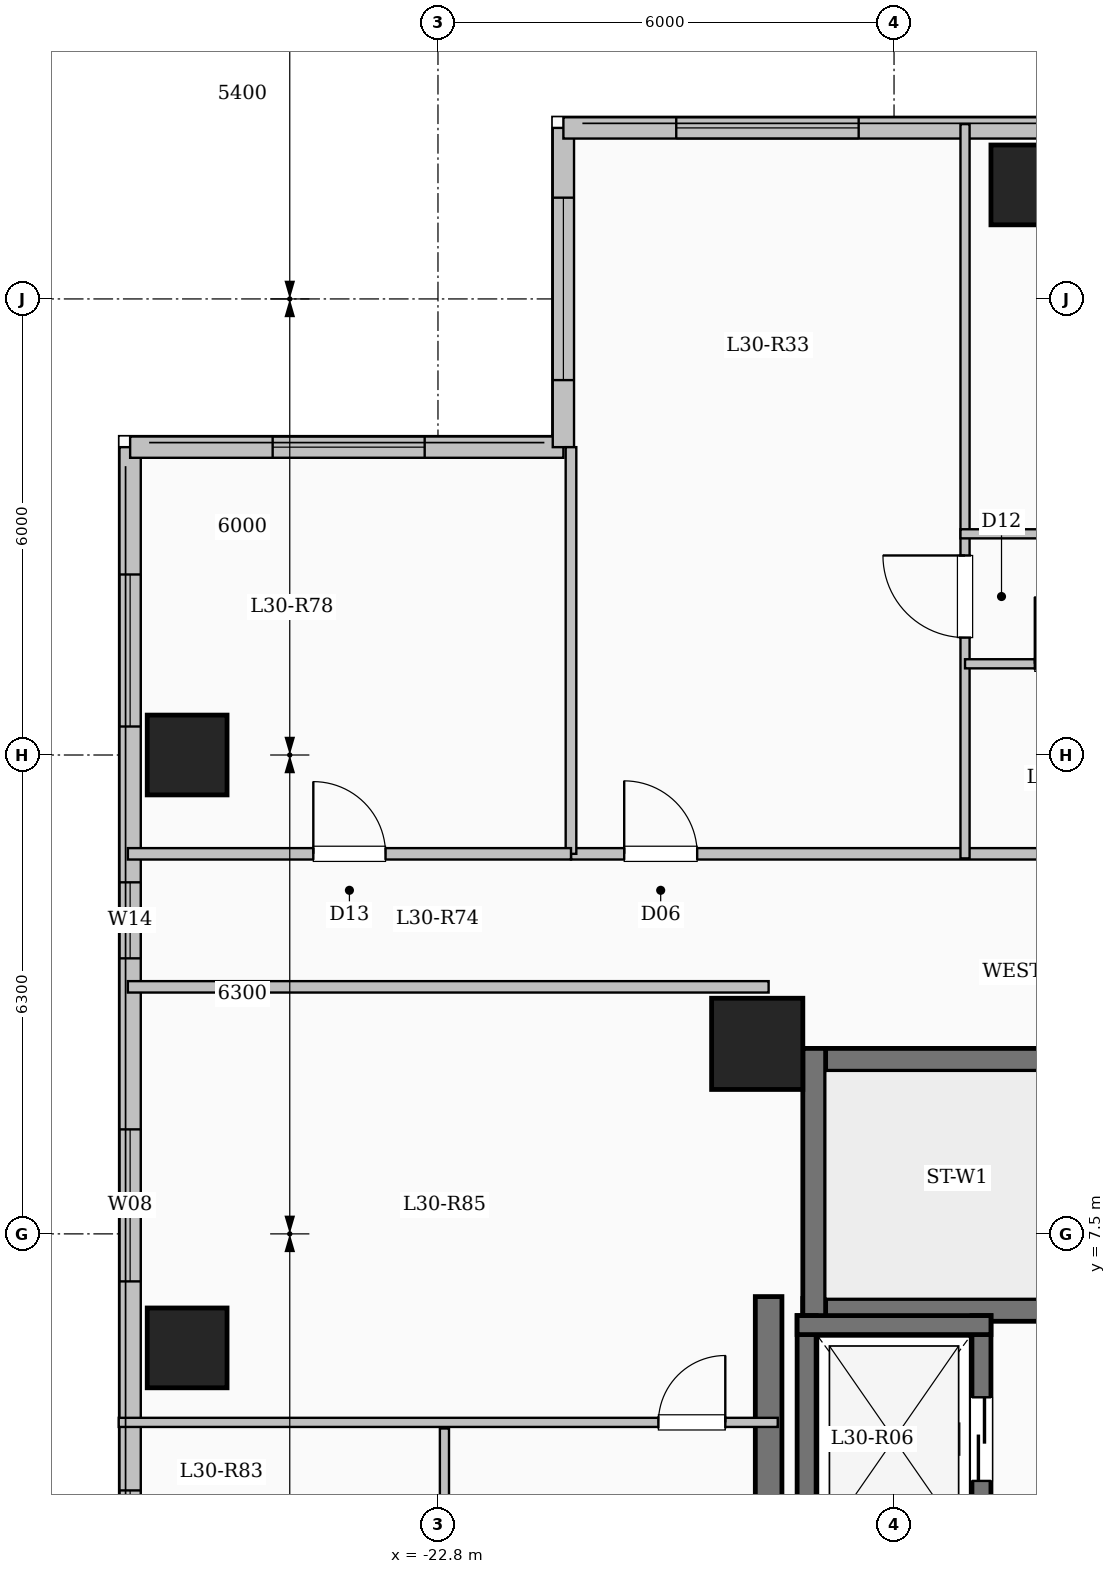
"""IFC4 building model, lengths in metres.
Left out: names, types, materials, properties, quantities, classifications, styles, units other than length and angle.
Written with IfcOpenShell. Run it as: python <this file> out.ifc"""

import sys

from ifc_helpers import new_model, si_unit, direction, frame, frame_2d, origin, origin_2d, place, context, subcontext, project, spatial, rectangle, extrude, element, fill, save


model = new_model("IFC4")
c1 = context("Model", 3, precision=1e-05, world=origin(), true_north=direction((0.0, 1.0)))
c2 = subcontext(c1, "Body", "Model", "MODEL_VIEW")
j1 = project(units=[si_unit("LENGTHUNIT", "METRE"), si_unit("PLANEANGLEUNIT", "RADIAN")], contexts=[c1])
p1 = place(None, origin())
s1 = spatial("IfcSite", under=j1, at=p1, CompositionType="ELEMENT")
p2 = place(p1, origin())
s2 = spatial("IfcBuilding", under=s1, at=p2, CompositionType="ELEMENT")
p3 = place(p2, frame((0.0, 0.0, 111.8)))
s3 = spatial("IfcBuildingStorey", under=s2, at=p3, CompositionType="ELEMENT", Elevation=111.8)
p4 = place(p3, frame((-18.6, 10.0, 0.0), z_axis=(0.0, 0.0, 1.0), x_axis=(1.0, 0.0, 0.0)))
e1 = element("IfcColumn", 1, at=p4, inside=s3, PredefinedType="COLUMN", context=c2, shape_type="SweptSolid", body=[
    extrude(rectangle(XDim=1.2, YDim=1.2, at=origin_2d()), origin(), (0.0, 0.0, 1.0), 3.35),
])
for number, where, z_axis, x_axis in (
    (2, (-15.0, 21.3, 0.0), (0.0, 0.0, 1.0), (1.0, 0.0, 0.0)),
    (3, (-26.1, 6.0, 0.0), (0.0, 0.0, 1.0), (1.0, 0.0, 0.0)),
    (4, (-26.1, 13.8, 0.0), (0.0, 0.0, 1.0), (1.0, 0.0, 0.0)),
):
    element("IfcColumn", number, at=place(p3, frame(where, z_axis=z_axis, x_axis=x_axis)), inside=s3, PredefinedType="COLUMN", context=c2, shape_type="SweptSolid", body=[
        extrude(rectangle(XDim=1.05, YDim=1.05, at=origin_2d()), origin(), (0.0, 0.0, 1.0), 3.35),
    ])
p5 = place(p3, frame((-26.85, -17.85, 0.0), z_axis=(0.0, 0.0, 1.0), x_axis=(0.0, 1.0, 0.0)))
e5 = element("IfcWall", 5, at=p5, inside=s3, PredefinedType="SOLIDWALL", context=c2, shape_type="SweptSolid", body=[
    extrude(rectangle(XDim=35.7, YDim=0.28, at=frame_2d((17.85, 0.0))), origin(), (0.0, 0.0, 1.0), 3.1),
])
p6 = place(p5, frame((2.55, 0.0, 0.9)))
e6 = element("IfcOpeningElement", 6, at=p6, cuts=e5, PredefinedType="OPENING", context=c2, shape_type="SweptSolid", body=[
    extrude(rectangle(XDim=2.4, YDim=1.8, at=frame_2d((1.2, 0.9))), frame((0.0, 0.15, 0.0), z_axis=(0.0, -1.0, 0.0), x_axis=(1.0, 0.0, 0.0)), (0.0, 0.0, 1.0), 0.3),
])
p7 = place(p5, frame((8.343, 0.0, 0.9)))
e7 = element("IfcOpeningElement", 7, at=p7, cuts=e5, PredefinedType="OPENING", context=c2, shape_type="SweptSolid", body=[
    extrude(rectangle(XDim=1.5, YDim=1.65, at=frame_2d((0.75, 0.825))), frame((0.0, 0.15, 0.0), z_axis=(0.0, -1.0, 0.0), x_axis=(1.0, 0.0, 0.0)), (0.0, 0.0, 1.0), 0.3),
])
p8 = place(p5, frame((13.75, 0.0, 0.9)))
e8 = element("IfcOpeningElement", 8, at=p8, cuts=e5, PredefinedType="OPENING", context=c2, shape_type="SweptSolid", body=[
    extrude(rectangle(XDim=2.4, YDim=1.8, at=frame_2d((1.2, 0.9))), frame((0.0, 0.15, 0.0), z_axis=(0.0, -1.0, 0.0), x_axis=(1.0, 0.0, 0.0)), (0.0, 0.0, 1.0), 0.3),
])
p9 = place(p5, frame((20.175, 0.0, 0.9)))
e9 = element("IfcOpeningElement", 9, at=p9, cuts=e5, PredefinedType="OPENING", context=c2, shape_type="SweptSolid", body=[
    extrude(rectangle(XDim=1.8, YDim=1.65, at=frame_2d((0.9, 0.825))), frame((0.0, 0.15, 0.0), z_axis=(0.0, -1.0, 0.0), x_axis=(1.0, 0.0, 0.0)), (0.0, 0.0, 1.0), 0.3),
])
p10 = place(p5, frame((24.725, 0.0, 0.9)))
e10 = element("IfcOpeningElement", 10, at=p10, cuts=e5, PredefinedType="OPENING", context=c2, shape_type="SweptSolid", body=[
    extrude(rectangle(XDim=2.0, YDim=1.7, at=frame_2d((1.0, 0.85))), frame((0.0, 0.15, 0.0), z_axis=(0.0, -1.0, 0.0), x_axis=(1.0, 0.0, 0.0)), (0.0, 0.0, 1.0), 0.3),
])
p11 = place(p5, frame((28.975, 0.0, 0.95)))
e11 = element("IfcOpeningElement", 11, at=p11, cuts=e5, PredefinedType="OPENING", context=c2, shape_type="SweptSolid", body=[
    extrude(rectangle(XDim=1.0, YDim=1.5, at=frame_2d((0.5, 0.75))), frame((0.0, 0.15, 0.0), z_axis=(0.0, -1.0, 0.0), x_axis=(1.0, 0.0, 0.0)), (0.0, 0.0, 1.0), 0.3),
])
p12 = place(p5, frame((32.025, 0.0, 0.9)))
e12 = element("IfcOpeningElement", 12, at=p12, cuts=e5, PredefinedType="OPENING", context=c2, shape_type="SweptSolid", body=[
    extrude(rectangle(XDim=2.0, YDim=1.7, at=frame_2d((1.0, 0.85))), frame((0.0, 0.15, 0.0), z_axis=(0.0, -1.0, 0.0), x_axis=(1.0, 0.0, 0.0)), (0.0, 0.0, 1.0), 0.3),
])
p13 = place(p3, frame((-26.85, 17.85, 0.0), z_axis=(0.0, 0.0, 1.0), x_axis=(1.0, 0.0, 0.0)))
e13 = element("IfcWall", 13, at=p13, inside=s3, PredefinedType="SOLIDWALL", context=c2, shape_type="SweptSolid", body=[
    extrude(rectangle(XDim=5.7, YDim=0.28, at=frame_2d((2.85, 0.0))), origin(), (0.0, 0.0, 1.0), 3.1),
])
p14 = place(p13, frame((1.875, 0.0, 0.9)))
e14 = element("IfcOpeningElement", 14, at=p14, cuts=e13, PredefinedType="OPENING", context=c2, shape_type="SweptSolid", body=[
    extrude(rectangle(XDim=2.0, YDim=1.7, at=frame_2d((1.0, 0.85))), frame((0.0, 0.15, 0.0), z_axis=(0.0, -1.0, 0.0), x_axis=(1.0, 0.0, 0.0)), (0.0, 0.0, 1.0), 0.3),
])
p15 = place(p3, frame((-21.15, 17.85, 0.0), z_axis=(0.0, 0.0, 1.0), x_axis=(0.0, 1.0, 0.0)))
e15 = element("IfcWall", 15, at=p15, inside=s3, PredefinedType="SOLIDWALL", context=c2, shape_type="SweptSolid", body=[
    extrude(rectangle(XDim=4.2, YDim=0.28, at=frame_2d((2.1, 0.0))), origin(), (0.0, 0.0, 1.0), 3.1),
])
p16 = place(p15, frame((0.882, 0.0, 0.9)))
e16 = element("IfcOpeningElement", 16, at=p16, cuts=e15, PredefinedType="OPENING", context=c2, shape_type="SweptSolid", body=[
    extrude(rectangle(XDim=2.4, YDim=1.8, at=frame_2d((1.2, 0.9))), frame((0.0, 0.15, 0.0), z_axis=(0.0, -1.0, 0.0), x_axis=(1.0, 0.0, 0.0)), (0.0, 0.0, 1.0), 0.3),
])
p17 = place(p3, frame((-21.15, 22.05, 0.0), z_axis=(0.0, 0.0, 1.0), x_axis=(1.0, 0.0, 0.0)))
e17 = element("IfcWall", 17, at=p17, inside=s3, PredefinedType="SOLIDWALL", context=c2, shape_type="SweptSolid", body=[
    extrude(rectangle(XDim=13.8, YDim=0.28, at=frame_2d((6.9, 0.0))), origin(), (0.0, 0.0, 1.0), 3.1),
])
p18 = place(p17, frame((1.485, 0.0, 0.9)))
e18 = element("IfcOpeningElement", 18, at=p18, cuts=e17, PredefinedType="OPENING", context=c2, shape_type="SweptSolid", body=[
    extrude(rectangle(XDim=2.4, YDim=1.8, at=frame_2d((1.2, 0.9))), frame((0.0, 0.15, 0.0), z_axis=(0.0, -1.0, 0.0), x_axis=(1.0, 0.0, 0.0)), (0.0, 0.0, 1.0), 0.3),
])
p19 = place(p17, frame((6.979, 0.0, 0.9)))
e19 = element("IfcOpeningElement", 19, at=p19, cuts=e17, PredefinedType="OPENING", context=c2, shape_type="SweptSolid", body=[
    extrude(rectangle(XDim=1.8, YDim=1.65, at=frame_2d((0.9, 0.825))), frame((0.0, 0.15, 0.0), z_axis=(0.0, -1.0, 0.0), x_axis=(1.0, 0.0, 0.0)), (0.0, 0.0, 1.0), 0.3),
])
p20 = place(p17, frame((11.294, 0.0, 0.9)))
e20 = element("IfcOpeningElement", 20, at=p20, cuts=e17, PredefinedType="OPENING", context=c2, shape_type="SweptSolid", body=[
    extrude(rectangle(XDim=1.8, YDim=1.65, at=frame_2d((0.9, 0.825))), frame((0.0, 0.15, 0.0), z_axis=(0.0, -1.0, 0.0), x_axis=(1.0, 0.0, 0.0)), (0.0, 0.0, 1.0), 0.3),
])
p21 = place(p3, frame((-18.0, 9.79, 0.0), z_axis=(0.0, 0.0, 1.0), x_axis=(1.0, 0.0, 0.0)))
e21 = element("IfcWall", 21, at=p21, inside=s3, PredefinedType="SHEAR", context=c2, shape_type="SweptSolid", body=[
    extrude(rectangle(XDim=8.0, YDim=0.3, at=frame_2d((4.0, 0.0))), origin(), (0.0, 0.0, 1.0), 3.35),
])
p22 = place(p3, frame((-18.0, 6.5, 0.0), z_axis=(0.0, 0.0, 1.0), x_axis=(1.0, 0.0, 0.0)))
e22 = element("IfcWall", 22, at=p22, inside=s3, PredefinedType="SHEAR", context=c2, shape_type="SweptSolid", body=[
    extrude(rectangle(XDim=8.0, YDim=0.3, at=frame_2d((4.0, 0.0))), origin(), (0.0, 0.0, 1.0), 3.35),
])
p23 = place(p22, frame((6.45, 0.0, 0.0)))
e23 = element("IfcOpeningElement", 23, at=p23, cuts=e22, PredefinedType="OPENING", context=c2, shape_type="SweptSolid", body=[
    extrude(rectangle(XDim=1.0, YDim=2.15, at=frame_2d((0.5, 1.075))), frame((0.0, 0.16, 0.0), z_axis=(0.0, -1.0, 0.0), x_axis=(1.0, 0.0, 0.0)), (0.0, 0.0, 1.0), 0.32),
])
p24 = place(p3, frame((-17.85, 6.35, 0.0), z_axis=(0.0, 0.0, 1.0), x_axis=(0.0, 1.0, 0.0)))
e24 = element("IfcWall", 24, at=p24, inside=s3, PredefinedType="SHEAR", context=c2, shape_type="SweptSolid", body=[
    extrude(rectangle(XDim=3.59, YDim=0.3, at=frame_2d((1.795, 0.0))), origin(), (0.0, 0.0, 1.0), 3.35),
])
p25 = place(p3, frame((-17.95, 3.175, 0.0), z_axis=(0.0, 0.0, 1.0), x_axis=(0.0, 1.0, 0.0)))
e25 = element("IfcWall", 25, at=p25, inside=s3, PredefinedType="SHEAR", context=c2, shape_type="SweptSolid", body=[
    extrude(rectangle(XDim=3.25, YDim=0.25, at=frame_2d((1.625, 0.0))), origin(), (0.0, 0.0, 1.0), 3.35),
])
p26 = place(p3, frame((-15.65, 3.175, 0.0), z_axis=(0.0, 0.0, 1.0), x_axis=(0.0, 1.0, 0.0)))
e26 = element("IfcWall", 26, at=p26, inside=s3, PredefinedType="SHEAR", context=c2, shape_type="SweptSolid", body=[
    extrude(rectangle(XDim=3.25, YDim=0.25, at=frame_2d((1.625, 0.0))), origin(), (0.0, 0.0, 1.0), 3.35),
])
p27 = place(p26, frame((1.075, 0.0, 0.0)))
e27 = element("IfcOpeningElement", 27, at=p27, cuts=e26, PredefinedType="OPENING", context=c2, shape_type="SweptSolid", body=[
    extrude(rectangle(XDim=1.1, YDim=2.15, at=frame_2d((0.55, 1.075))), frame((0.0, 0.135, 0.0), z_axis=(0.0, -1.0, 0.0), x_axis=(1.0, 0.0, 0.0)), (0.0, 0.0, 1.0), 0.27),
])
p28 = place(p3, frame((-18.075, 6.3, 0.0), z_axis=(0.0, 0.0, 1.0), x_axis=(1.0, 0.0, 0.0)))
e28 = element("IfcWall", 28, at=p28, inside=s3, PredefinedType="SHEAR", context=c2, shape_type="SweptSolid", body=[
    extrude(rectangle(XDim=2.55, YDim=0.25, at=frame_2d((1.275, 0.0))), origin(), (0.0, 0.0, 1.0), 3.35),
])
p29 = place(p3, frame((-18.45, -7.375, 0.0), z_axis=(0.0, 0.0, 1.0), x_axis=(0.0, 1.0, 0.0)))
e29 = element("IfcWall", 29, at=p29, inside=s3, PredefinedType="SHEAR", context=c2, shape_type="SweptSolid", body=[
    extrude(rectangle(XDim=14.05, YDim=0.35, at=frame_2d((7.025, 0.0))), origin(), (0.0, 0.0, 1.0), 3.35),
])
p30 = place(p3, frame((-21.05, 12.5, 0.0), z_axis=(0.0, 0.0, 1.0), x_axis=(1.0, 0.0, 0.0)))
e30 = element("IfcWall", 30, at=p30, inside=s3, PredefinedType="PARTITIONING", context=c2, shape_type="SweptSolid", body=[
    extrude(rectangle(XDim=17.2, YDim=0.15, at=frame_2d((8.6, 0.0))), origin(), (0.0, 0.0, 1.0), 3.1),
])
p31 = place(p30, frame((0.7, 0.0, 0.0)))
e31 = element("IfcOpeningElement", 31, at=p31, cuts=e30, PredefinedType="OPENING", context=c2, shape_type="SweptSolid", body=[
    extrude(rectangle(XDim=0.96, YDim=2.15, at=frame_2d((0.48, 1.075))), frame((0.0, 0.085, 0.0), z_axis=(0.0, -1.0, 0.0), x_axis=(1.0, 0.0, 0.0)), (0.0, 0.0, 1.0), 0.17),
])
p32 = place(p30, frame((11.068, 0.0, 0.0)))
e32 = element("IfcOpeningElement", 32, at=p32, cuts=e30, PredefinedType="OPENING", context=c2, shape_type="SweptSolid", body=[
    extrude(rectangle(XDim=0.96, YDim=2.15, at=frame_2d((0.48, 1.075))), frame((0.0, 0.085, 0.0), z_axis=(0.0, -1.0, 0.0), x_axis=(1.0, 0.0, 0.0)), (0.0, 0.0, 1.0), 0.17),
])
p33 = place(p3, frame((-15.866, 12.44, 0.0), z_axis=(0.0, 0.0, 1.0), x_axis=(0.0, 1.0, 0.0)))
e33 = element("IfcWall", 33, at=p33, inside=s3, PredefinedType="PARTITIONING", context=c2, shape_type="SweptSolid", body=[
    extrude(rectangle(XDim=9.66, YDim=0.12, at=frame_2d((4.83, 0.0))), origin(), (0.0, 0.0, 1.0), 3.1),
])
p34 = place(p33, frame((2.905, 0.0, 0.0)))
e34 = element("IfcOpeningElement", 34, at=p34, cuts=e33, PredefinedType="OPENING", context=c2, shape_type="SweptSolid", body=[
    extrude(rectangle(XDim=1.08, YDim=2.15, at=frame_2d((0.54, 1.075))), frame((0.0, 0.07, 0.0), z_axis=(0.0, -1.0, 0.0), x_axis=(1.0, 0.0, 0.0)), (0.0, 0.0, 1.0), 0.14),
])
p35 = place(p3, frame((-15.866, 15.0, 0.0), z_axis=(0.0, 0.0, 1.0), x_axis=(1.0, 0.0, 0.0)))
e35 = element("IfcWall", 35, at=p35, inside=s3, PredefinedType="PARTITIONING", context=c2, shape_type="SweptSolid", body=[
    extrude(rectangle(XDim=2.716, YDim=0.12, at=frame_2d((1.358, 0.0))), origin(), (0.0, 0.0, 1.0), 3.1),
])
p36 = place(p35, frame((0.918, 0.0, 0.0)))
e36 = element("IfcOpeningElement", 36, at=p36, cuts=e35, PredefinedType="OPENING", context=c2, shape_type="SweptSolid", body=[
    extrude(rectangle(XDim=0.88, YDim=2.1, at=frame_2d((0.44, 1.05))), frame((0.0, 0.07, 0.0), z_axis=(0.0, -1.0, 0.0), x_axis=(1.0, 0.0, 0.0)), (0.0, 0.0, 1.0), 0.14),
])
p37 = place(p3, frame((-15.926, 16.71, 0.0), z_axis=(0.0, 0.0, 1.0), x_axis=(1.0, 0.0, 0.0)))
e37 = element("IfcWall", 37, at=p37, inside=s3, PredefinedType="PARTITIONING", context=c2, shape_type="SweptSolid", body=[
    extrude(rectangle(XDim=5.304, YDim=0.12, at=frame_2d((2.652, 0.0))), origin(), (0.0, 0.0, 1.0), 3.1),
])
p38 = place(p37, frame((2.122, 0.0, 0.0)))
e38 = element("IfcOpeningElement", 38, at=p38, cuts=e37, PredefinedType="OPENING", context=c2, shape_type="SweptSolid", body=[
    extrude(rectangle(XDim=0.88, YDim=2.1, at=frame_2d((0.44, 1.05))), frame((0.0, 0.07, 0.0), z_axis=(0.0, -1.0, 0.0), x_axis=(1.0, 0.0, 0.0)), (0.0, 0.0, 1.0), 0.14),
])
p39 = place(p3, frame((-26.88, 10.75, 0.0), z_axis=(0.0, 0.0, 1.0), x_axis=(1.0, 0.0, 0.0)))
e39 = element("IfcWall", 39, at=p39, inside=s3, PredefinedType="PARTITIONING", context=c2, shape_type="SweptSolid", body=[
    extrude(rectangle(XDim=8.43, YDim=0.15, at=frame_2d((4.215, 0.0))), origin(), (0.0, 0.0, 1.0), 3.1),
])
p40 = place(p3, frame((-21.05, 12.5, 0.0), z_axis=(0.0, 0.0, 1.0), x_axis=(0.0, 1.0, 0.0)))
e40 = element("IfcWall", 40, at=p40, inside=s3, PredefinedType="PARTITIONING", context=c2, shape_type="SweptSolid", body=[
    extrude(rectangle(XDim=5.35, YDim=0.14, at=frame_2d((2.675, 0.0))), origin(), (0.0, 0.0, 1.0), 3.1),
])
p41 = place(p3, frame((-26.88, 12.5, 0.0), z_axis=(0.0, 0.0, 1.0), x_axis=(1.0, 0.0, 0.0)))
e41 = element("IfcWall", 41, at=p41, inside=s3, PredefinedType="PARTITIONING", context=c2, shape_type="SweptSolid", body=[
    extrude(rectangle(XDim=5.83, YDim=0.15, at=frame_2d((2.915, 0.0))), origin(), (0.0, 0.0, 1.0), 3.1),
])
p42 = place(p41, frame((2.44, 0.0, 0.0)))
e42 = element("IfcOpeningElement", 42, at=p42, cuts=e41, PredefinedType="OPENING", context=c2, shape_type="SweptSolid", body=[
    extrude(rectangle(XDim=0.95, YDim=2.15, at=frame_2d((0.475, 1.075))), frame((0.0, 0.085, 0.0), z_axis=(0.0, -1.0, 0.0), x_axis=(1.0, 0.0, 0.0)), (0.0, 0.0, 1.0), 0.17),
])
p43 = place(p3, frame((-27.0, 5.02, 0.0), z_axis=(0.0, 0.0, 1.0), x_axis=(1.0, 0.0, 0.0)))
e43 = element("IfcWall", 43, at=p43, inside=s3, PredefinedType="PARTITIONING", context=c2, shape_type="SweptSolid", body=[
    extrude(rectangle(XDim=8.67, YDim=0.12, at=frame_2d((4.335, 0.0))), origin(), (0.0, 0.0, 1.0), 3.1),
])
p44 = place(p43, frame((7.1, 0.0, 0.0)))
e44 = element("IfcOpeningElement", 44, at=p44, cuts=e43, PredefinedType="OPENING", context=c2, shape_type="SweptSolid", body=[
    extrude(rectangle(XDim=0.88, YDim=2.1, at=frame_2d((0.44, 1.05))), frame((0.0, 0.07, 0.0), z_axis=(0.0, -1.0, 0.0), x_axis=(1.0, 0.0, 0.0)), (0.0, 0.0, 1.0), 0.14),
])
p45 = place(p3, frame((-22.715, 1.36, 0.0), z_axis=(0.0, 0.0, 1.0), x_axis=(0.0, 1.0, 0.0)))
e45 = element("IfcWall", 45, at=p45, inside=s3, PredefinedType="PARTITIONING", context=c2, shape_type="SweptSolid", body=[
    extrude(rectangle(XDim=3.58, YDim=0.12, at=frame_2d((1.79, 0.0))), origin(), (0.0, 0.0, 1.0), 3.1),
])
p46 = place(p9, origin())
e46 = element("IfcWindow", 46, at=p46, inside=s3, PartitioningType="SINGLE_PANEL", PredefinedType="WINDOW", context=c2, shape_type="SweptSolid", body=[
    extrude(rectangle(XDim=1.8, YDim=1.65, at=frame_2d((0.9, 0.825))), frame((0.0, 0.03, 0.0), z_axis=(0.0, -1.0, 0.0), x_axis=(1.0, 0.0, 0.0)), (0.0, 0.0, 1.0), 0.06),
])
fill(e9, e46)
p47 = place(p10, origin())
e47 = element("IfcWindow", 47, at=p47, inside=s3, PartitioningType="SINGLE_PANEL", PredefinedType="WINDOW", context=c2, shape_type="SweptSolid", body=[
    extrude(rectangle(XDim=2.0, YDim=1.7, at=frame_2d((1.0, 0.85))), frame((0.0, 0.03, 0.0), z_axis=(0.0, -1.0, 0.0), x_axis=(1.0, 0.0, 0.0)), (0.0, 0.0, 1.0), 0.06),
])
fill(e10, e47)
p48 = place(p11, origin())
e48 = element("IfcWindow", 48, at=p48, inside=s3, PartitioningType="SINGLE_PANEL", PredefinedType="WINDOW", context=c2, shape_type="SweptSolid", body=[
    extrude(rectangle(XDim=1.0, YDim=1.5, at=frame_2d((0.5, 0.75))), frame((0.0, 0.03, 0.0), z_axis=(0.0, -1.0, 0.0), x_axis=(1.0, 0.0, 0.0)), (0.0, 0.0, 1.0), 0.06),
])
fill(e11, e48)
p49 = place(p12, origin())
e49 = element("IfcWindow", 49, at=p49, inside=s3, PartitioningType="SINGLE_PANEL", PredefinedType="WINDOW", context=c2, shape_type="SweptSolid", body=[
    extrude(rectangle(XDim=2.0, YDim=1.7, at=frame_2d((1.0, 0.85))), frame((0.0, 0.03, 0.0), z_axis=(0.0, -1.0, 0.0), x_axis=(1.0, 0.0, 0.0)), (0.0, 0.0, 1.0), 0.06),
])
fill(e12, e49)
p50 = place(p14, origin())
e50 = element("IfcWindow", 50, at=p50, inside=s3, PartitioningType="SINGLE_PANEL", PredefinedType="WINDOW", context=c2, shape_type="SweptSolid", body=[
    extrude(rectangle(XDim=2.0, YDim=1.7, at=frame_2d((1.0, 0.85))), frame((0.0, 0.03, 0.0), z_axis=(0.0, -1.0, 0.0), x_axis=(1.0, 0.0, 0.0)), (0.0, 0.0, 1.0), 0.06),
])
fill(e14, e50)
p51 = place(p16, origin())
e51 = element("IfcWindow", 51, at=p51, inside=s3, PartitioningType="SINGLE_PANEL", PredefinedType="WINDOW", context=c2, shape_type="SweptSolid", body=[
    extrude(rectangle(XDim=2.4, YDim=1.8, at=frame_2d((1.2, 0.9))), frame((0.0, 0.03, 0.0), z_axis=(0.0, -1.0, 0.0), x_axis=(1.0, 0.0, 0.0)), (0.0, 0.0, 1.0), 0.06),
])
fill(e16, e51)
p52 = place(p18, origin())
e52 = element("IfcWindow", 52, at=p52, inside=s3, PartitioningType="SINGLE_PANEL", PredefinedType="WINDOW", context=c2, shape_type="SweptSolid", body=[
    extrude(rectangle(XDim=2.4, YDim=1.8, at=frame_2d((1.2, 0.9))), frame((0.0, 0.03, 0.0), z_axis=(0.0, -1.0, 0.0), x_axis=(1.0, 0.0, 0.0)), (0.0, 0.0, 1.0), 0.06),
])
fill(e18, e52)
p53 = place(p27, origin())
e53 = element("IfcDoor", 53, at=p53, inside=s3, OperationType="SLIDING_TO_LEFT", PredefinedType="DOOR", context=c2, shape_type="SweptSolid", body=[
    extrude(rectangle(XDim=1.1, YDim=2.15, at=frame_2d((0.55, 1.075))), frame((0.0, 0.025, 0.0), z_axis=(0.0, -1.0, 0.0), x_axis=(1.0, 0.0, 0.0)), (0.0, 0.0, 1.0), 0.05),
])
fill(e27, e53)
p54 = place(p31, origin())
e54 = element("IfcDoor", 54, at=p54, inside=s3, OperationType="SINGLE_SWING_LEFT", PredefinedType="DOOR", context=c2, shape_type="SweptSolid", body=[
    extrude(rectangle(XDim=0.96, YDim=2.15, at=frame_2d((0.48, 1.075))), frame((0.0, 0.025, 0.0), z_axis=(0.0, -1.0, 0.0), x_axis=(1.0, 0.0, 0.0)), (0.0, 0.0, 1.0), 0.05),
])
fill(e31, e54)
p55 = place(p34, origin())
e55 = element("IfcDoor", 55, at=p55, inside=s3, OperationType="SINGLE_SWING_RIGHT", PredefinedType="DOOR", context=c2, shape_type="SweptSolid", body=[
    extrude(rectangle(XDim=1.08, YDim=2.15, at=frame_2d((0.54, 1.075))), frame((0.0, 0.025, 0.0), z_axis=(0.0, -1.0, 0.0), x_axis=(1.0, 0.0, 0.0)), (0.0, 0.0, 1.0), 0.05),
])
fill(e34, e55)
p56 = place(p36, origin())
e56 = element("IfcDoor", 56, at=p56, inside=s3, OperationType="SINGLE_SWING_LEFT", PredefinedType="DOOR", context=c2, shape_type="SweptSolid", body=[
    extrude(rectangle(XDim=0.88, YDim=2.1, at=frame_2d((0.44, 1.05))), frame((0.0, 0.025, 0.0), z_axis=(0.0, -1.0, 0.0), x_axis=(1.0, 0.0, 0.0)), (0.0, 0.0, 1.0), 0.05),
])
fill(e36, e56)
p57 = place(p42, origin())
e57 = element("IfcDoor", 57, at=p57, inside=s3, OperationType="SINGLE_SWING_LEFT", PredefinedType="DOOR", context=c2, shape_type="SweptSolid", body=[
    extrude(rectangle(XDim=0.95, YDim=2.15, at=frame_2d((0.475, 1.075))), frame((0.0, 0.025, 0.0), z_axis=(0.0, -1.0, 0.0), x_axis=(1.0, 0.0, 0.0)), (0.0, 0.0, 1.0), 0.05),
])
fill(e42, e57)
p58 = place(p44, origin())
e58 = element("IfcDoor", 58, at=p58, inside=s3, OperationType="SINGLE_SWING_RIGHT", PredefinedType="DOOR", context=c2, shape_type="SweptSolid", body=[
    extrude(rectangle(XDim=0.88, YDim=2.1, at=frame_2d((0.44, 1.05))), frame((0.0, 0.025, 0.0), z_axis=(0.0, -1.0, 0.0), x_axis=(1.0, 0.0, 0.0)), (0.0, 0.0, 1.0), 0.05),
])
fill(e44, e58)
save(model, sys.argv[1])
